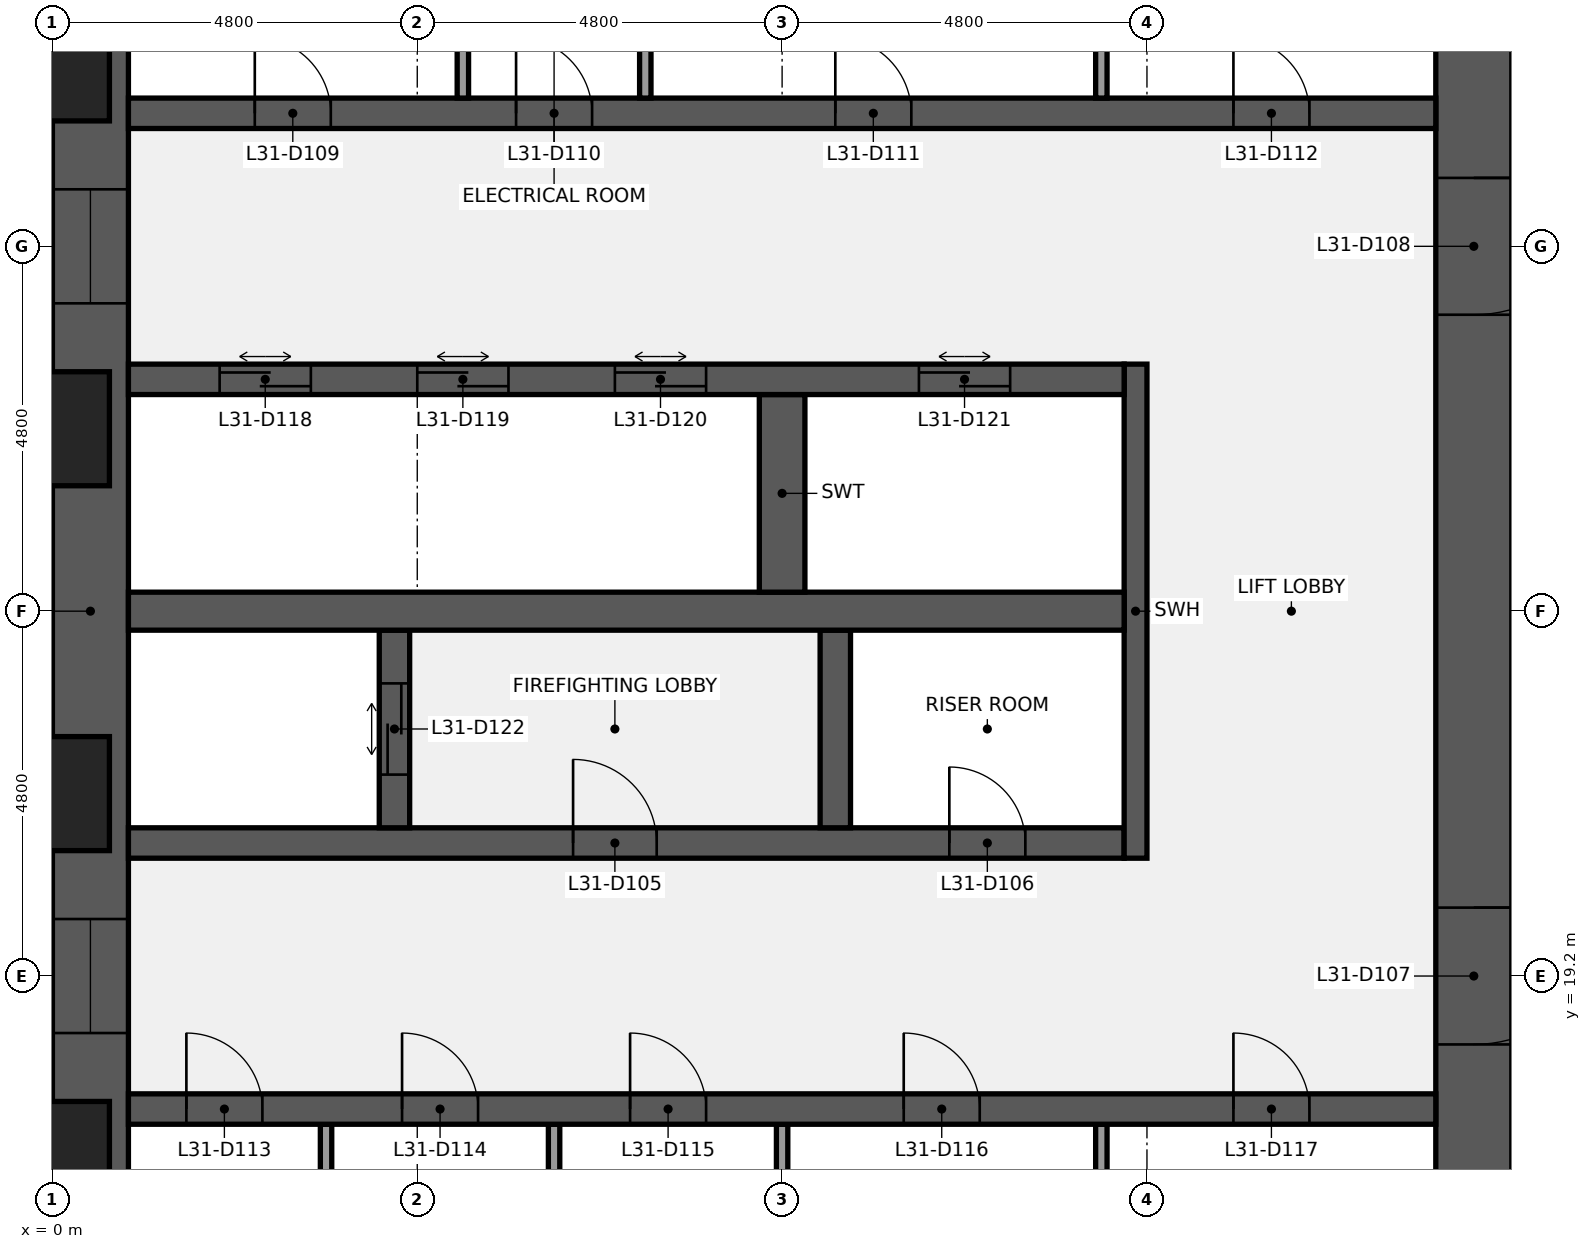
"""IFC4 building model, lengths in metres.
Left out: names, types, materials, properties, quantities, classifications, styles, units other than length and angle.
Written with IfcOpenShell. Run it as: python <this file> out.ifc"""

import sys

from ifc_helpers import new_model, si_unit, direction, frame, frame_2d, origin, place, context, subcontext, project, spatial, rectangle, extrude, element, fill, save


model = new_model("IFC4")
c1 = context("Model", 3, precision=1e-05, world=origin(), true_north=direction((0.0, 1.0)))
c2 = subcontext(c1, "Body", "Model", "MODEL_VIEW")
j1 = project(units=[si_unit("LENGTHUNIT", "METRE"), si_unit("PLANEANGLEUNIT", "RADIAN")], contexts=[c1])
p1 = place(None, origin())
s1 = spatial("IfcSite", under=j1, at=p1, CompositionType="ELEMENT")
p2 = place(p1, origin())
s2 = spatial("IfcBuilding", under=s1, at=p2, CompositionType="ELEMENT")
p3 = place(p2, frame((0.0, 0.0, 144.1)))
s3 = spatial("IfcBuildingStorey", under=s2, at=p3, CompositionType="ELEMENT", Elevation=144.1)
p4 = place(p3, frame((0.5, 9.6, 0.0), z_axis=(0.0, 0.0, 1.0), x_axis=(0.0, 1.0, 0.0)))
e1 = element("IfcWall", 1, at=p4, inside=s3, PredefinedType="SHEAR", context=c2, shape_type="SweptSolid", body=[
    extrude(rectangle(XDim=28.8, YDim=1.0, at=frame_2d((14.4, 0.0))), origin(), (0.0, 0.0, 1.0), 3.84),
])
p5 = place(p4, frame((8.85, 0.0, 0.9)))
e2 = element("IfcOpeningElement", 2, at=p5, cuts=e1, PredefinedType="OPENING", context=c2, shape_type="SweptSolid", body=[
    extrude(rectangle(XDim=1.5, YDim=1.5, at=frame_2d((0.75, 0.75))), frame((0.0, 0.51, 0.0), z_axis=(0.0, -1.0, 0.0), x_axis=(1.0, 0.0, 0.0)), (0.0, 0.0, 1.0), 1.02),
])
p6 = place(p4, frame((18.45, 0.0, 0.9)))
e3 = element("IfcOpeningElement", 3, at=p6, cuts=e1, PredefinedType="OPENING", context=c2, shape_type="SweptSolid", body=[
    extrude(rectangle(XDim=1.5, YDim=1.5, at=frame_2d((0.75, 0.75))), frame((0.0, 0.51, 0.0), z_axis=(0.0, -1.0, 0.0), x_axis=(1.0, 0.0, 0.0)), (0.0, 0.0, 1.0), 1.02),
])
p7 = place(p3, frame((18.7, 38.4, 0.0), z_axis=(0.0, 0.0, 1.0), x_axis=(0.0, -1.0, 0.0)))
e4 = element("IfcWall", 4, at=p7, inside=s3, PredefinedType="SHEAR", context=c2, shape_type="SweptSolid", body=[
    extrude(rectangle(XDim=28.8, YDim=1.0, at=frame_2d((14.4, 0.0))), origin(), (0.0, 0.0, 1.0), 3.84),
])
p8 = place(p7, frame((18.3, 0.0, 0.0)))
e5 = element("IfcOpeningElement", 5, at=p8, cuts=e4, PredefinedType="OPENING", context=c2, shape_type="SweptSolid", body=[
    extrude(rectangle(XDim=1.8, YDim=2.1, at=frame_2d((0.9, 1.05))), frame((0.0, 0.51, 0.0), z_axis=(0.0, -1.0, 0.0), x_axis=(1.0, 0.0, 0.0)), (0.0, 0.0, 1.0), 1.02),
])
p9 = place(p7, frame((8.7, 0.0, 0.0)))
e6 = element("IfcOpeningElement", 6, at=p9, cuts=e4, PredefinedType="OPENING", context=c2, shape_type="SweptSolid", body=[
    extrude(rectangle(XDim=1.8, YDim=2.1, at=frame_2d((0.9, 1.05))), frame((0.0, 0.51, 0.0), z_axis=(0.0, -1.0, 0.0), x_axis=(1.0, 0.0, 0.0)), (0.0, 0.0, 1.0), 1.02),
])
for number, where, z_axis, x_axis in (
    (7, (3.6, 14.65, 0.0), (0.0, 0.0, 1.0), (0.0, 1.0, 0.0)),
    (8, (6.6, 14.65, 0.0), (0.0, 0.0, 1.0), (0.0, 1.0, 0.0)),
    (9, (9.6, 14.65, 0.0), (0.0, 0.0, 1.0), (0.0, 1.0, 0.0)),
    (10, (13.8, 14.65, 0.0), (0.0, 0.0, 1.0), (0.0, 1.0, 0.0)),
):
    element("IfcWall", number, at=place(p3, frame(where, z_axis=z_axis, x_axis=x_axis)), inside=s3, PredefinedType="PARTITIONING", context=c2, shape_type="SweptSolid", body=[
        extrude(rectangle(XDim=2.6, YDim=0.15, at=frame_2d((1.3, 0.0))), origin(), (0.0, 0.0, 1.0), 3.84),
    ])
p10 = place(p3, frame((1.0, 17.45, 0.0), z_axis=(0.0, 0.0, 1.0), x_axis=(1.0, 0.0, 0.0)))
e11 = element("IfcWall", 11, at=p10, inside=s3, PredefinedType="SHEAR", context=c2, shape_type="SweptSolid", body=[
    extrude(rectangle(XDim=17.2, YDim=0.4, at=frame_2d((8.6, 0.0))), origin(), (0.0, 0.0, 1.0), 3.84),
])
p11 = place(p10, frame((0.762, 0.0, 0.0)))
e12 = element("IfcOpeningElement", 12, at=p11, cuts=e11, PredefinedType="OPENING", context=c2, shape_type="SweptSolid", body=[
    extrude(rectangle(XDim=1.0, YDim=2.1, at=frame_2d((0.5, 1.05))), frame((0.0, 0.21, 0.0), z_axis=(0.0, -1.0, 0.0), x_axis=(1.0, 0.0, 0.0)), (0.0, 0.0, 1.0), 0.42),
])
p12 = place(p10, frame((3.6, 0.0, 0.0)))
e13 = element("IfcOpeningElement", 13, at=p12, cuts=e11, PredefinedType="OPENING", context=c2, shape_type="SweptSolid", body=[
    extrude(rectangle(XDim=1.0, YDim=2.1, at=frame_2d((0.5, 1.05))), frame((0.0, 0.21, 0.0), z_axis=(0.0, -1.0, 0.0), x_axis=(1.0, 0.0, 0.0)), (0.0, 0.0, 1.0), 0.42),
])
p13 = place(p10, frame((6.6, 0.0, 0.0)))
e14 = element("IfcOpeningElement", 14, at=p13, cuts=e11, PredefinedType="OPENING", context=c2, shape_type="SweptSolid", body=[
    extrude(rectangle(XDim=1.0, YDim=2.1, at=frame_2d((0.5, 1.05))), frame((0.0, 0.21, 0.0), z_axis=(0.0, -1.0, 0.0), x_axis=(1.0, 0.0, 0.0)), (0.0, 0.0, 1.0), 0.42),
])
p14 = place(p10, frame((10.2, 0.0, 0.0)))
e15 = element("IfcOpeningElement", 15, at=p14, cuts=e11, PredefinedType="OPENING", context=c2, shape_type="SweptSolid", body=[
    extrude(rectangle(XDim=1.0, YDim=2.1, at=frame_2d((0.5, 1.05))), frame((0.0, 0.21, 0.0), z_axis=(0.0, -1.0, 0.0), x_axis=(1.0, 0.0, 0.0)), (0.0, 0.0, 1.0), 0.42),
])
p15 = place(p10, frame((14.538, 0.0, 0.0)))
e16 = element("IfcOpeningElement", 16, at=p15, cuts=e11, PredefinedType="OPENING", context=c2, shape_type="SweptSolid", body=[
    extrude(rectangle(XDim=1.0, YDim=2.1, at=frame_2d((0.5, 1.05))), frame((0.0, 0.21, 0.0), z_axis=(0.0, -1.0, 0.0), x_axis=(1.0, 0.0, 0.0)), (0.0, 0.0, 1.0), 0.42),
])
p16 = place(p3, frame((1.0, 20.95, 0.0), z_axis=(0.0, 0.0, 1.0), x_axis=(1.0, 0.0, 0.0)))
e17 = element("IfcWall", 17, at=p16, inside=s3, PredefinedType="SHEAR", context=c2, shape_type="SweptSolid", body=[
    extrude(rectangle(XDim=13.1, YDim=0.4, at=frame_2d((6.55, 0.0))), origin(), (0.0, 0.0, 1.0), 3.84),
])
p17 = place(p16, frame((5.85, 0.0, 0.0)))
e18 = element("IfcOpeningElement", 18, at=p17, cuts=e17, PredefinedType="OPENING", context=c2, shape_type="SweptSolid", body=[
    extrude(rectangle(XDim=1.1, YDim=2.1, at=frame_2d((0.55, 1.05))), frame((0.0, 0.21, 0.0), z_axis=(0.0, -1.0, 0.0), x_axis=(1.0, 0.0, 0.0)), (0.0, 0.0, 1.0), 0.42),
])
p18 = place(p16, frame((10.8, 0.0, 0.0)))
e19 = element("IfcOpeningElement", 19, at=p18, cuts=e17, PredefinedType="OPENING", context=c2, shape_type="SweptSolid", body=[
    extrude(rectangle(XDim=1.0, YDim=2.1, at=frame_2d((0.5, 1.05))), frame((0.0, 0.21, 0.0), z_axis=(0.0, -1.0, 0.0), x_axis=(1.0, 0.0, 0.0)), (0.0, 0.0, 1.0), 0.42),
])
p19 = place(p3, frame((14.25, 20.75, 0.0), z_axis=(0.0, 0.0, 1.0), x_axis=(0.0, 1.0, 0.0)))
e20 = element("IfcWall", 20, at=p19, inside=s3, PredefinedType="SHEAR", context=c2, shape_type="SweptSolid", body=[
    extrude(rectangle(XDim=6.5, YDim=0.3, at=frame_2d((3.25, 0.0))), origin(), (0.0, 0.0, 1.0), 3.84),
])
p20 = place(p3, frame((4.5, 21.15, 0.0), z_axis=(0.0, 0.0, 1.0), x_axis=(0.0, 1.0, 0.0)))
e21 = element("IfcWall", 21, at=p20, inside=s3, PredefinedType="SHEAR", context=c2, shape_type="SweptSolid", body=[
    extrude(rectangle(XDim=2.6, YDim=0.4, at=frame_2d((1.3, 0.0))), origin(), (0.0, 0.0, 1.0), 3.84),
])
p21 = place(p20, frame((0.7, 0.0, 0.0)))
e22 = element("IfcOpeningElement", 22, at=p21, cuts=e21, PredefinedType="OPENING", context=c2, shape_type="SweptSolid", body=[
    extrude(rectangle(XDim=1.2, YDim=2.1, at=frame_2d((0.6, 1.05))), frame((0.0, 0.21, 0.0), z_axis=(0.0, -1.0, 0.0), x_axis=(1.0, 0.0, 0.0)), (0.0, 0.0, 1.0), 0.42),
])
p22 = place(p3, frame((10.3, 21.15, 0.0), z_axis=(0.0, 0.0, 1.0), x_axis=(0.0, 1.0, 0.0)))
e23 = element("IfcWall", 23, at=p22, inside=s3, PredefinedType="SHEAR", context=c2, shape_type="SweptSolid", body=[
    extrude(rectangle(XDim=2.6, YDim=0.4, at=frame_2d((1.3, 0.0))), origin(), (0.0, 0.0, 1.0), 3.84),
])
p23 = place(p3, frame((1.0, 24.0, 0.0), z_axis=(0.0, 0.0, 1.0), x_axis=(1.0, 0.0, 0.0)))
e24 = element("IfcWall", 24, at=p23, inside=s3, PredefinedType="SHEAR", context=c2, shape_type="SweptSolid", body=[
    extrude(rectangle(XDim=13.1, YDim=0.5, at=frame_2d((6.55, 0.0))), origin(), (0.0, 0.0, 1.0), 3.84),
])
p24 = place(p3, frame((9.6, 24.25, 0.0), z_axis=(0.0, 0.0, 1.0), x_axis=(0.0, 1.0, 0.0)))
e25 = element("IfcWall", 25, at=p24, inside=s3, PredefinedType="SHEAR", context=c2, shape_type="SweptSolid", body=[
    extrude(rectangle(XDim=2.6, YDim=0.6, at=frame_2d((1.3, 0.0))), origin(), (0.0, 0.0, 1.0), 3.84),
])
p25 = place(p3, frame((1.0, 27.05, 0.0), z_axis=(0.0, 0.0, 1.0), x_axis=(1.0, 0.0, 0.0)))
e26 = element("IfcWall", 26, at=p25, inside=s3, PredefinedType="SHEAR", context=c2, shape_type="SweptSolid", body=[
    extrude(rectangle(XDim=13.1, YDim=0.4, at=frame_2d((6.55, 0.0))), origin(), (0.0, 0.0, 1.0), 3.84),
])
p26 = place(p25, frame((1.2, 0.0, 0.0)))
e27 = element("IfcOpeningElement", 27, at=p26, cuts=e26, PredefinedType="OPENING", context=c2, shape_type="SweptSolid", body=[
    extrude(rectangle(XDim=1.2, YDim=2.1, at=frame_2d((0.6, 1.05))), frame((0.0, 0.21, 0.0), z_axis=(0.0, -1.0, 0.0), x_axis=(1.0, 0.0, 0.0)), (0.0, 0.0, 1.0), 0.42),
])
p27 = place(p25, frame((3.8, 0.0, 0.0)))
e28 = element("IfcOpeningElement", 28, at=p27, cuts=e26, PredefinedType="OPENING", context=c2, shape_type="SweptSolid", body=[
    extrude(rectangle(XDim=1.2, YDim=2.1, at=frame_2d((0.6, 1.05))), frame((0.0, 0.21, 0.0), z_axis=(0.0, -1.0, 0.0), x_axis=(1.0, 0.0, 0.0)), (0.0, 0.0, 1.0), 0.42),
])
p28 = place(p25, frame((6.4, 0.0, 0.0)))
e29 = element("IfcOpeningElement", 29, at=p28, cuts=e26, PredefinedType="OPENING", context=c2, shape_type="SweptSolid", body=[
    extrude(rectangle(XDim=1.2, YDim=2.1, at=frame_2d((0.6, 1.05))), frame((0.0, 0.21, 0.0), z_axis=(0.0, -1.0, 0.0), x_axis=(1.0, 0.0, 0.0)), (0.0, 0.0, 1.0), 0.42),
])
p29 = place(p25, frame((10.4, 0.0, 0.0)))
e30 = element("IfcOpeningElement", 30, at=p29, cuts=e26, PredefinedType="OPENING", context=c2, shape_type="SweptSolid", body=[
    extrude(rectangle(XDim=1.2, YDim=2.1, at=frame_2d((0.6, 1.05))), frame((0.0, 0.21, 0.0), z_axis=(0.0, -1.0, 0.0), x_axis=(1.0, 0.0, 0.0)), (0.0, 0.0, 1.0), 0.42),
])
p30 = place(p3, frame((1.0, 30.55, 0.0), z_axis=(0.0, 0.0, 1.0), x_axis=(1.0, 0.0, 0.0)))
e31 = element("IfcWall", 31, at=p30, inside=s3, PredefinedType="SHEAR", context=c2, shape_type="SweptSolid", body=[
    extrude(rectangle(XDim=17.2, YDim=0.4, at=frame_2d((8.6, 0.0))), origin(), (0.0, 0.0, 1.0), 3.84),
])
p31 = place(p30, frame((1.663, 0.0, 0.0)))
e32 = element("IfcOpeningElement", 32, at=p31, cuts=e31, PredefinedType="OPENING", context=c2, shape_type="SweptSolid", body=[
    extrude(rectangle(XDim=1.0, YDim=2.1, at=frame_2d((0.5, 1.05))), frame((0.0, 0.21, 0.0), z_axis=(0.0, -1.0, 0.0), x_axis=(1.0, 0.0, 0.0)), (0.0, 0.0, 1.0), 0.42),
])
p32 = place(p30, frame((5.1, 0.0, 0.0)))
e33 = element("IfcOpeningElement", 33, at=p32, cuts=e31, PredefinedType="OPENING", context=c2, shape_type="SweptSolid", body=[
    extrude(rectangle(XDim=1.0, YDim=2.1, at=frame_2d((0.5, 1.05))), frame((0.0, 0.21, 0.0), z_axis=(0.0, -1.0, 0.0), x_axis=(1.0, 0.0, 0.0)), (0.0, 0.0, 1.0), 0.42),
])
p33 = place(p30, frame((9.3, 0.0, 0.0)))
e34 = element("IfcOpeningElement", 34, at=p33, cuts=e31, PredefinedType="OPENING", context=c2, shape_type="SweptSolid", body=[
    extrude(rectangle(XDim=1.0, YDim=2.1, at=frame_2d((0.5, 1.05))), frame((0.0, 0.21, 0.0), z_axis=(0.0, -1.0, 0.0), x_axis=(1.0, 0.0, 0.0)), (0.0, 0.0, 1.0), 0.42),
])
p34 = place(p30, frame((14.538, 0.0, 0.0)))
e35 = element("IfcOpeningElement", 35, at=p34, cuts=e31, PredefinedType="OPENING", context=c2, shape_type="SweptSolid", body=[
    extrude(rectangle(XDim=1.0, YDim=2.1, at=frame_2d((0.5, 1.05))), frame((0.0, 0.21, 0.0), z_axis=(0.0, -1.0, 0.0), x_axis=(1.0, 0.0, 0.0)), (0.0, 0.0, 1.0), 0.42),
])
for number, where, z_axis, x_axis in (
    (36, (5.4, 30.75, 0.0), (0.0, 0.0, 1.0), (0.0, 1.0, 0.0)),
    (37, (7.8, 30.75, 0.0), (0.0, 0.0, 1.0), (0.0, 1.0, 0.0)),
    (38, (13.8, 30.75, 0.0), (0.0, 0.0, 1.0), (0.0, 1.0, 0.0)),
):
    element("IfcWall", number, at=place(p3, frame(where, z_axis=z_axis, x_axis=x_axis)), inside=s3, PredefinedType="PARTITIONING", context=c2, shape_type="SweptSolid", body=[
        extrude(rectangle(XDim=2.6, YDim=0.15, at=frame_2d((1.3, 0.0))), origin(), (0.0, 0.0, 1.0), 3.84),
    ])
p35 = place(p17, origin())
e39 = element("IfcDoor", 39, at=p35, inside=s3, OperationType="SINGLE_SWING_LEFT", PredefinedType="DOOR", context=c2, shape_type="SweptSolid", body=[
    extrude(rectangle(XDim=1.1, YDim=2.1, at=frame_2d((0.55, 1.05))), frame((0.0, 0.025, 0.0), z_axis=(0.0, -1.0, 0.0), x_axis=(1.0, 0.0, 0.0)), (0.0, 0.0, 1.0), 0.05),
])
fill(e18, e39)
p36 = place(p18, origin())
e40 = element("IfcDoor", 40, at=p36, inside=s3, OperationType="SINGLE_SWING_LEFT", PredefinedType="DOOR", context=c2, shape_type="SweptSolid", body=[
    extrude(rectangle(XDim=1.0, YDim=2.1, at=frame_2d((0.5, 1.05))), frame((0.0, 0.025, 0.0), z_axis=(0.0, -1.0, 0.0), x_axis=(1.0, 0.0, 0.0)), (0.0, 0.0, 1.0), 0.05),
])
fill(e19, e40)
p37 = place(p8, origin())
e41 = element("IfcDoor", 41, at=p37, inside=s3, OperationType="DOUBLE_DOOR_SINGLE_SWING", PredefinedType="DOOR", context=c2, shape_type="SweptSolid", body=[
    extrude(rectangle(XDim=1.8, YDim=2.1, at=frame_2d((0.9, 1.05))), frame((0.0, 0.025, 0.0), z_axis=(0.0, -1.0, 0.0), x_axis=(1.0, 0.0, 0.0)), (0.0, 0.0, 1.0), 0.05),
])
fill(e5, e41)
p38 = place(p9, origin())
e42 = element("IfcDoor", 42, at=p38, inside=s3, OperationType="DOUBLE_DOOR_SINGLE_SWING", PredefinedType="DOOR", context=c2, shape_type="SweptSolid", body=[
    extrude(rectangle(XDim=1.8, YDim=2.1, at=frame_2d((0.9, 1.05))), frame((0.0, 0.025, 0.0), z_axis=(0.0, -1.0, 0.0), x_axis=(1.0, 0.0, 0.0)), (0.0, 0.0, 1.0), 0.05),
])
fill(e6, e42)
p39 = place(p31, origin())
e43 = element("IfcDoor", 43, at=p39, inside=s3, OperationType="SINGLE_SWING_LEFT", PredefinedType="DOOR", context=c2, shape_type="SweptSolid", body=[
    extrude(rectangle(XDim=1.0, YDim=2.1, at=frame_2d((0.5, 1.05))), frame((0.0, 0.025, 0.0), z_axis=(0.0, -1.0, 0.0), x_axis=(1.0, 0.0, 0.0)), (0.0, 0.0, 1.0), 0.05),
])
fill(e32, e43)
p40 = place(p32, origin())
e44 = element("IfcDoor", 44, at=p40, inside=s3, OperationType="SINGLE_SWING_LEFT", PredefinedType="DOOR", context=c2, shape_type="SweptSolid", body=[
    extrude(rectangle(XDim=1.0, YDim=2.1, at=frame_2d((0.5, 1.05))), frame((0.0, 0.025, 0.0), z_axis=(0.0, -1.0, 0.0), x_axis=(1.0, 0.0, 0.0)), (0.0, 0.0, 1.0), 0.05),
])
fill(e33, e44)
p41 = place(p33, origin())
e45 = element("IfcDoor", 45, at=p41, inside=s3, OperationType="SINGLE_SWING_LEFT", PredefinedType="DOOR", context=c2, shape_type="SweptSolid", body=[
    extrude(rectangle(XDim=1.0, YDim=2.1, at=frame_2d((0.5, 1.05))), frame((0.0, 0.025, 0.0), z_axis=(0.0, -1.0, 0.0), x_axis=(1.0, 0.0, 0.0)), (0.0, 0.0, 1.0), 0.05),
])
fill(e34, e45)
p42 = place(p34, origin())
e46 = element("IfcDoor", 46, at=p42, inside=s3, OperationType="SINGLE_SWING_LEFT", PredefinedType="DOOR", context=c2, shape_type="SweptSolid", body=[
    extrude(rectangle(XDim=1.0, YDim=2.1, at=frame_2d((0.5, 1.05))), frame((0.0, 0.025, 0.0), z_axis=(0.0, -1.0, 0.0), x_axis=(1.0, 0.0, 0.0)), (0.0, 0.0, 1.0), 0.05),
])
fill(e35, e46)
p43 = place(p11, origin())
e47 = element("IfcDoor", 47, at=p43, inside=s3, OperationType="SINGLE_SWING_LEFT", PredefinedType="DOOR", context=c2, shape_type="SweptSolid", body=[
    extrude(rectangle(XDim=1.0, YDim=2.1, at=frame_2d((0.5, 1.05))), frame((0.0, 0.025, 0.0), z_axis=(0.0, -1.0, 0.0), x_axis=(1.0, 0.0, 0.0)), (0.0, 0.0, 1.0), 0.05),
])
fill(e12, e47)
p44 = place(p12, origin())
e48 = element("IfcDoor", 48, at=p44, inside=s3, OperationType="SINGLE_SWING_LEFT", PredefinedType="DOOR", context=c2, shape_type="SweptSolid", body=[
    extrude(rectangle(XDim=1.0, YDim=2.1, at=frame_2d((0.5, 1.05))), frame((0.0, 0.025, 0.0), z_axis=(0.0, -1.0, 0.0), x_axis=(1.0, 0.0, 0.0)), (0.0, 0.0, 1.0), 0.05),
])
fill(e13, e48)
p45 = place(p13, origin())
e49 = element("IfcDoor", 49, at=p45, inside=s3, OperationType="SINGLE_SWING_LEFT", PredefinedType="DOOR", context=c2, shape_type="SweptSolid", body=[
    extrude(rectangle(XDim=1.0, YDim=2.1, at=frame_2d((0.5, 1.05))), frame((0.0, 0.025, 0.0), z_axis=(0.0, -1.0, 0.0), x_axis=(1.0, 0.0, 0.0)), (0.0, 0.0, 1.0), 0.05),
])
fill(e14, e49)
p46 = place(p14, origin())
e50 = element("IfcDoor", 50, at=p46, inside=s3, OperationType="SINGLE_SWING_LEFT", PredefinedType="DOOR", context=c2, shape_type="SweptSolid", body=[
    extrude(rectangle(XDim=1.0, YDim=2.1, at=frame_2d((0.5, 1.05))), frame((0.0, 0.025, 0.0), z_axis=(0.0, -1.0, 0.0), x_axis=(1.0, 0.0, 0.0)), (0.0, 0.0, 1.0), 0.05),
])
fill(e15, e50)
p47 = place(p15, origin())
e51 = element("IfcDoor", 51, at=p47, inside=s3, OperationType="SINGLE_SWING_LEFT", PredefinedType="DOOR", context=c2, shape_type="SweptSolid", body=[
    extrude(rectangle(XDim=1.0, YDim=2.1, at=frame_2d((0.5, 1.05))), frame((0.0, 0.025, 0.0), z_axis=(0.0, -1.0, 0.0), x_axis=(1.0, 0.0, 0.0)), (0.0, 0.0, 1.0), 0.05),
])
fill(e16, e51)
p48 = place(p26, origin())
e52 = element("IfcDoor", 52, at=p48, inside=s3, OperationType="DOUBLE_DOOR_SLIDING", PredefinedType="DOOR", context=c2, shape_type="SweptSolid", body=[
    extrude(rectangle(XDim=1.2, YDim=2.1, at=frame_2d((0.6, 1.05))), frame((0.0, 0.025, 0.0), z_axis=(0.0, -1.0, 0.0), x_axis=(1.0, 0.0, 0.0)), (0.0, 0.0, 1.0), 0.05),
])
fill(e27, e52)
p49 = place(p27, origin())
e53 = element("IfcDoor", 53, at=p49, inside=s3, OperationType="DOUBLE_DOOR_SLIDING", PredefinedType="DOOR", context=c2, shape_type="SweptSolid", body=[
    extrude(rectangle(XDim=1.2, YDim=2.1, at=frame_2d((0.6, 1.05))), frame((0.0, 0.025, 0.0), z_axis=(0.0, -1.0, 0.0), x_axis=(1.0, 0.0, 0.0)), (0.0, 0.0, 1.0), 0.05),
])
fill(e28, e53)
p50 = place(p28, origin())
e54 = element("IfcDoor", 54, at=p50, inside=s3, OperationType="DOUBLE_DOOR_SLIDING", PredefinedType="DOOR", context=c2, shape_type="SweptSolid", body=[
    extrude(rectangle(XDim=1.2, YDim=2.1, at=frame_2d((0.6, 1.05))), frame((0.0, 0.025, 0.0), z_axis=(0.0, -1.0, 0.0), x_axis=(1.0, 0.0, 0.0)), (0.0, 0.0, 1.0), 0.05),
])
fill(e29, e54)
p51 = place(p29, origin())
e55 = element("IfcDoor", 55, at=p51, inside=s3, OperationType="DOUBLE_DOOR_SLIDING", PredefinedType="DOOR", context=c2, shape_type="SweptSolid", body=[
    extrude(rectangle(XDim=1.2, YDim=2.1, at=frame_2d((0.6, 1.05))), frame((0.0, 0.025, 0.0), z_axis=(0.0, -1.0, 0.0), x_axis=(1.0, 0.0, 0.0)), (0.0, 0.0, 1.0), 0.05),
])
fill(e30, e55)
p52 = place(p21, origin())
e56 = element("IfcDoor", 56, at=p52, inside=s3, OperationType="DOUBLE_DOOR_SLIDING", PredefinedType="DOOR", context=c2, shape_type="SweptSolid", body=[
    extrude(rectangle(XDim=1.2, YDim=2.1, at=frame_2d((0.6, 1.05))), frame((0.0, 0.025, 0.0), z_axis=(0.0, -1.0, 0.0), x_axis=(1.0, 0.0, 0.0)), (0.0, 0.0, 1.0), 0.05),
])
fill(e22, e56)
p53 = place(p5, origin())
e57 = element("IfcWindow", 57, at=p53, inside=s3, PartitioningType="SINGLE_PANEL", PredefinedType="WINDOW", context=c2, shape_type="SweptSolid", body=[
    extrude(rectangle(XDim=1.5, YDim=1.5, at=frame_2d((0.75, 0.75))), frame((0.0, 0.03, 0.0), z_axis=(0.0, -1.0, 0.0), x_axis=(1.0, 0.0, 0.0)), (0.0, 0.0, 1.0), 0.06),
])
fill(e2, e57)
p54 = place(p6, origin())
e58 = element("IfcWindow", 58, at=p54, inside=s3, PartitioningType="SINGLE_PANEL", PredefinedType="WINDOW", context=c2, shape_type="SweptSolid", body=[
    extrude(rectangle(XDim=1.5, YDim=1.5, at=frame_2d((0.75, 0.75))), frame((0.0, 0.03, 0.0), z_axis=(0.0, -1.0, 0.0), x_axis=(1.0, 0.0, 0.0)), (0.0, 0.0, 1.0), 0.06),
])
fill(e3, e58)
save(model, sys.argv[1])
